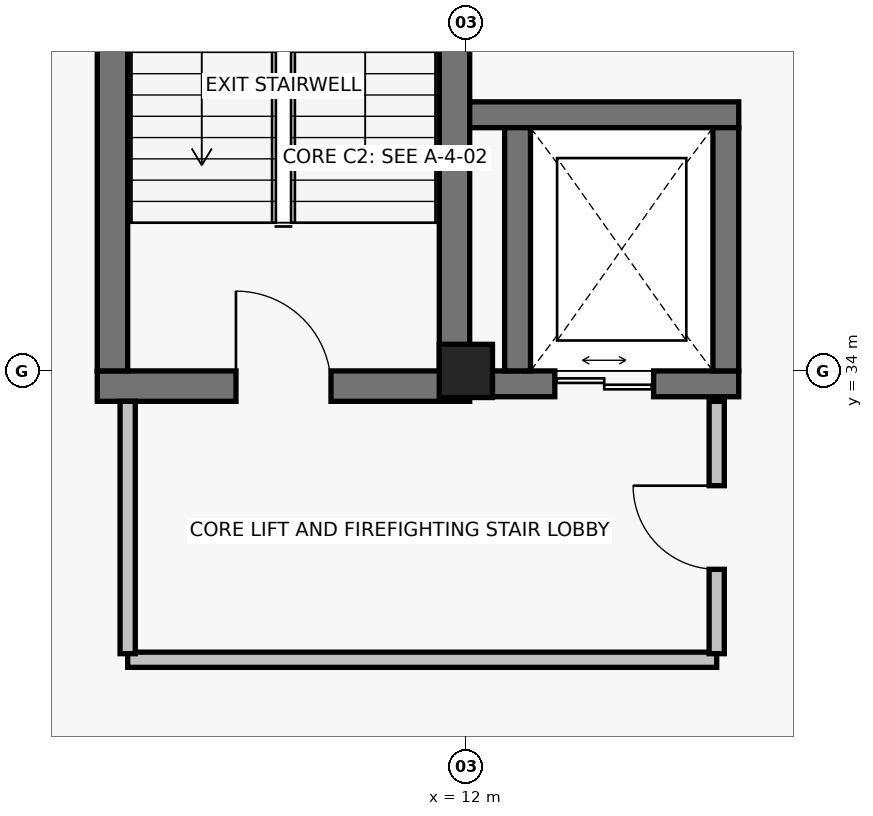
"""IFC4 building model, lengths in metres.
Left out: names, types, materials, properties, quantities, classifications, styles, units other than length and angle.
Written with IfcOpenShell. Run it as: python <this file> out.ifc"""

import sys

from ifc_helpers import new_model, si_unit, direction, frame, frame_2d, origin, origin_2d, place, context, subcontext, project, spatial, rectangle, extrude, element, fill, save


model = new_model("IFC4")
c1 = context("Model", 3, precision=1e-05, world=origin(), true_north=direction((0.0, 1.0)))
c2 = subcontext(c1, "Body", "Model", "MODEL_VIEW")
j1 = project(units=[si_unit("LENGTHUNIT", "METRE"), si_unit("PLANEANGLEUNIT", "RADIAN")], contexts=[c1])
p1 = place(None, origin())
s1 = spatial("IfcSite", under=j1, at=p1, CompositionType="ELEMENT")
p2 = place(p1, origin())
s2 = spatial("IfcBuilding", under=s1, at=p2, CompositionType="ELEMENT")
p3 = place(p2, origin())
s3 = spatial("IfcBuildingStorey", under=s2, at=p3, CompositionType="ELEMENT", Elevation=0.0)
p4 = place(p3, frame((12.0, 34.0, 0.0), z_axis=(0.0, 0.0, 1.0), x_axis=(1.0, 0.0, 0.0)))
e1 = element("IfcColumn", 1, at=p4, inside=s3, PredefinedType="COLUMN", context=c2, shape_type="SweptSolid", body=[
    extrude(rectangle(XDim=0.7, YDim=0.7, at=origin_2d()), origin(), (0.0, 0.0, 1.0), 6.6),
])
p5 = place(p3, frame((7.15, 33.8, 0.0), z_axis=(0.0, 0.0, 1.0), x_axis=(1.0, 0.0, 0.0)))
e2 = element("IfcWall", 2, at=p5, inside=s3, PredefinedType="SHEAR", context=c2, shape_type="SweptSolid", body=[
    extrude(rectangle(XDim=4.9, YDim=0.4, at=frame_2d((2.45, 0.0))), origin(), (0.0, 0.0, 1.0), 6.32),
])
p6 = place(p5, frame((1.825, 0.0, 0.0)))
e3 = element("IfcOpeningElement", 3, at=p6, cuts=e2, PredefinedType="OPENING", context=c2, shape_type="SweptSolid", body=[
    extrude(rectangle(XDim=1.25, YDim=2.2, at=frame_2d((0.625, 1.1))), frame((0.0, 0.215, 0.0), z_axis=(0.0, -1.0, 0.0), x_axis=(1.0, 0.0, 0.0)), (0.0, 0.0, 1.0), 0.43),
])
for number, where, z_axis, x_axis in (
    (4, (7.35, 43.4, 0.0), (0.0, 0.0, 1.0), (0.0, -1.0, 0.0)),
    (5, (11.85, 34.0, 0.0), (0.0, 0.0, 1.0), (0.0, 1.0, 0.0)),
):
    element("IfcWall", number, at=place(p3, frame(where, z_axis=z_axis, x_axis=x_axis)), inside=s3, PredefinedType="SHEAR", context=c2, shape_type="SweptSolid", body=[
        extrude(rectangle(XDim=9.4, YDim=0.4, at=frame_2d((4.7, 0.0))), origin(), (0.0, 0.0, 1.0), 6.32),
    ])
p7 = place(p3, frame((12.05, 33.83, 0.0), z_axis=(0.0, 0.0, 1.0), x_axis=(1.0, 0.0, 0.0)))
e6 = element("IfcWall", 6, at=p7, inside=s3, PredefinedType="SHEAR", context=c2, shape_type="SweptSolid", body=[
    extrude(rectangle(XDim=3.54, YDim=0.34, at=frame_2d((1.77, 0.0))), origin(), (0.0, 0.0, 1.0), 6.32),
])
p8 = place(p7, frame((1.12, 0.0, 0.0)))
e7 = element("IfcOpeningElement", 7, at=p8, cuts=e6, PredefinedType="OPENING", context=c2, shape_type="SweptSolid", body=[
    extrude(rectangle(XDim=1.3, YDim=2.25, at=frame_2d((0.65, 1.125))), frame((0.0, 0.185, 0.0), z_axis=(0.0, -1.0, 0.0), x_axis=(1.0, 0.0, 0.0)), (0.0, 0.0, 1.0), 0.37),
])
p9 = place(p3, frame((15.59, 37.37, 0.0), z_axis=(0.0, 0.0, 1.0), x_axis=(-1.0, 0.0, 0.0)))
e8 = element("IfcWall", 8, at=p9, inside=s3, PredefinedType="SHEAR", context=c2, shape_type="SweptSolid", body=[
    extrude(rectangle(XDim=3.54, YDim=0.34, at=frame_2d((1.77, 0.0))), origin(), (0.0, 0.0, 1.0), 6.32),
])
for number, where, z_axis, x_axis in (
    (9, (12.68, 37.2, 0.0), (0.0, 0.0, 1.0), (0.0, -1.0, 0.0)),
    (10, (15.42, 34.0, 0.0), (0.0, 0.0, 1.0), (0.0, 1.0, 0.0)),
):
    element("IfcWall", number, at=place(p3, frame(where, z_axis=z_axis, x_axis=x_axis)), inside=s3, PredefinedType="SHEAR", context=c2, shape_type="SweptSolid", body=[
        extrude(rectangle(XDim=3.2, YDim=0.34, at=frame_2d((1.6, 0.0))), origin(), (0.0, 0.0, 1.0), 6.32),
    ])
p10 = place(p3, frame((7.55, 30.2, 0.0), z_axis=(0.0, 0.0, 1.0), x_axis=(1.0, 0.0, 0.0)))
e11 = element("IfcWall", 11, at=p10, inside=s3, PredefinedType="PARTITIONING", context=c2, shape_type="SweptSolid", body=[
    extrude(rectangle(XDim=7.75, YDim=0.2, at=frame_2d((3.875, 0.0))), origin(), (0.0, 0.0, 1.0), 5.946),
])
p11 = place(p3, frame((7.55, 33.6, 0.0), z_axis=(0.0, 0.0, 1.0), x_axis=(0.0, -1.0, 0.0)))
e12 = element("IfcWall", 12, at=p11, inside=s3, PredefinedType="PARTITIONING", context=c2, shape_type="SweptSolid", body=[
    extrude(rectangle(XDim=3.32, YDim=0.2, at=frame_2d((1.66, 0.0))), origin(), (0.0, 0.0, 1.0), 6.32),
])
p12 = place(p3, frame((15.3, 30.28, 0.0), z_axis=(0.0, 0.0, 1.0), x_axis=(0.0, 1.0, 0.0)))
e13 = element("IfcWall", 13, at=p12, inside=s3, PredefinedType="PARTITIONING", context=c2, shape_type="SweptSolid", body=[
    extrude(rectangle(XDim=3.32, YDim=0.2, at=frame_2d((1.66, 0.0))), origin(), (0.0, 0.0, 1.0), 6.32),
])
p13 = place(p12, frame((1.11, 0.0, 0.0)))
e14 = element("IfcOpeningElement", 14, at=p13, cuts=e13, PredefinedType="OPENING", context=c2, shape_type="SweptSolid", body=[
    extrude(rectangle(XDim=1.1, YDim=2.15, at=frame_2d((0.55, 1.075))), frame((0.0, 0.115, 0.0), z_axis=(0.0, -1.0, 0.0), x_axis=(1.0, 0.0, 0.0)), (0.0, 0.0, 1.0), 0.23),
])
p14 = place(p6, origin())
e15 = element("IfcDoor", 15, at=p14, inside=s3, OperationType="SINGLE_SWING_LEFT", PredefinedType="DOOR", context=c2, shape_type="SweptSolid", body=[
    extrude(rectangle(XDim=1.25, YDim=2.2, at=frame_2d((0.625, 1.1))), frame((0.0, 0.025, 0.0), z_axis=(0.0, -1.0, 0.0), x_axis=(1.0, 0.0, 0.0)), (0.0, 0.0, 1.0), 0.05),
])
fill(e3, e15)
p15 = place(p8, origin())
e16 = element("IfcDoor", 16, at=p15, inside=s3, OperationType="DOUBLE_DOOR_SLIDING", PredefinedType="DOOR", context=c2, shape_type="SweptSolid", body=[
    extrude(rectangle(XDim=1.3, YDim=2.25, at=frame_2d((0.65, 1.125))), frame((0.0, 0.025, 0.0), z_axis=(0.0, -1.0, 0.0), x_axis=(1.0, 0.0, 0.0)), (0.0, 0.0, 1.0), 0.05),
])
fill(e7, e16)
p16 = place(p13, origin())
e17 = element("IfcDoor", 17, at=p16, inside=s3, OperationType="SINGLE_SWING_RIGHT", PredefinedType="DOOR", context=c2, shape_type="SweptSolid", body=[
    extrude(rectangle(XDim=1.1, YDim=2.15, at=frame_2d((0.55, 1.075))), frame((0.0, 0.025, 0.0), z_axis=(0.0, -1.0, 0.0), x_axis=(1.0, 0.0, 0.0)), (0.0, 0.0, 1.0), 0.05),
])
fill(e14, e17)
save(model, sys.argv[1])
